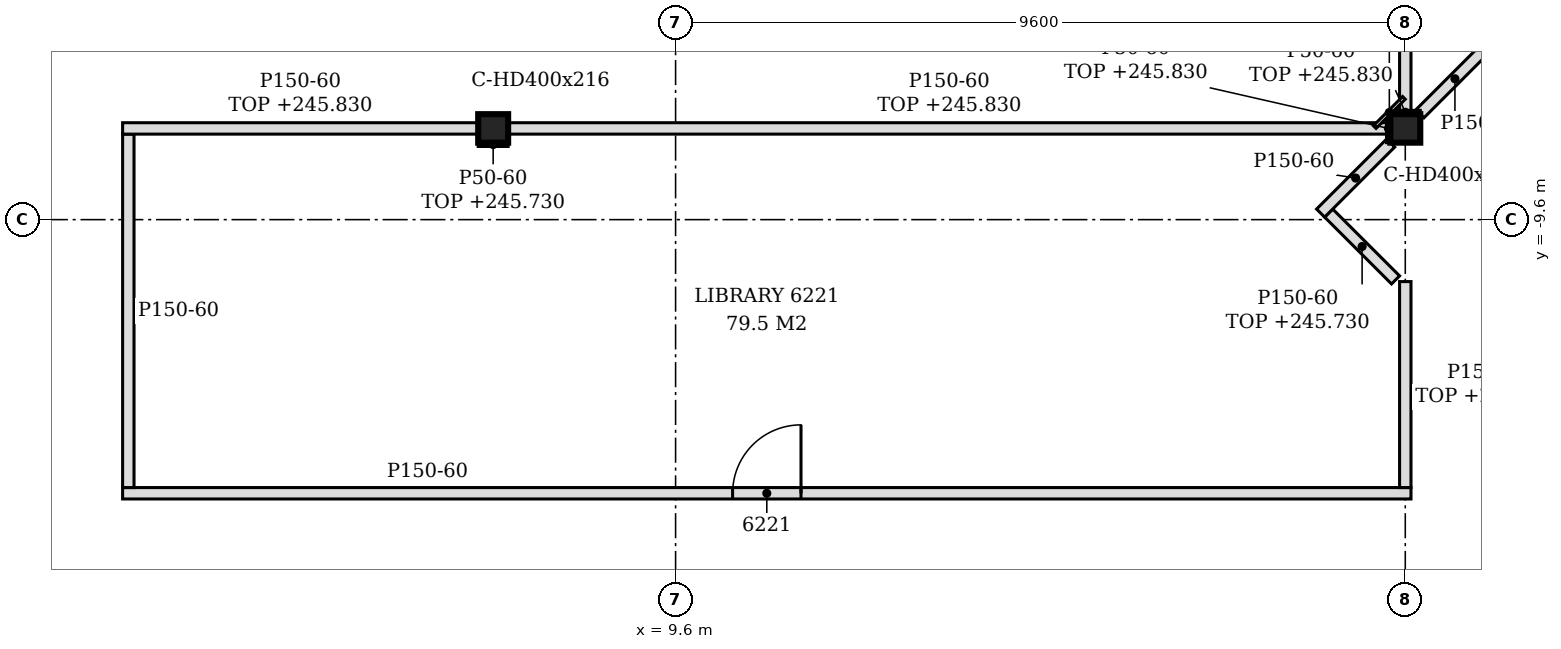
"""IFC4 building model, lengths in metres.
Left out: names, types, materials, properties, quantities, classifications, styles, units other than length and angle.
Written with IfcOpenShell. Run it as: python <this file> out.ifc"""

import sys

from ifc_helpers import new_model, si_unit, direction, frame, frame_2d, origin, origin_2d, place, context, subcontext, project, spatial, polyline, rectangle, i_section, outline, extrude, element, fill, save


model = new_model("IFC4")
c1 = context("Model", 3, precision=1e-05, world=origin(), true_north=direction((0.0, 1.0)))
c2 = subcontext(c1, "Body", "Model", "MODEL_VIEW")
j1 = project(units=[si_unit("LENGTHUNIT", "METRE"), si_unit("PLANEANGLEUNIT", "RADIAN")], contexts=[c1])
p1 = place(None, origin())
s1 = spatial("IfcSite", under=j1, at=p1, CompositionType="ELEMENT")
p2 = place(p1, origin())
s2 = spatial("IfcBuilding", under=s1, at=p2, CompositionType="ELEMENT")
p3 = place(p2, frame((0.0, 0.0, 243.0)))
s3 = spatial("IfcBuildingStorey", under=s2, at=p3, CompositionType="ELEMENT", Elevation=243.0)
for number, where, z_axis, x_axis in (
    (1, (7.2, -8.4, -0.15), (0.0, 0.0, 1.0), (1.0, 0.0, 0.0)),
    (2, (19.2, -8.4, -0.15), (0.0, 0.0, 1.0), (1.0, 0.0, 0.0)),
):
    element("IfcColumn", number, at=place(p3, frame(where, z_axis=z_axis, x_axis=x_axis)), inside=s3, PredefinedType="COLUMN", context=c2, shape_type="SweptSolid", body=[
        extrude(i_section(OverallWidth=0.394, OverallDepth=0.375, WebThickness=0.017, FlangeThickness=0.028, FilletRadius=0.015, at=origin_2d()), origin(), (0.0, 0.0, 1.0), 3.6),
    ])
p4 = place(p3, frame((2.325, -13.2, 0.0), z_axis=(0.0, 0.0, 1.0), x_axis=(1.0, 0.0, 0.0)))
e3 = element("IfcWall", 3, at=p4, inside=s3, PredefinedType="PARTITIONING", context=c2, shape_type="SweptSolid", body=[
    extrude(outline(polyline([(0.0, 0.0), (16.95, 0.0), (16.95, 2.73), (16.725, 2.73), (16.723, 3.45), (5.025, 3.45), (5.023, 2.73), (4.725, 2.73), (4.723, 3.45), (0.0, 3.45), (0.0, 0.0)])), frame((0.0, 0.075, 0.0), z_axis=(0.0, -1.0, 0.0), x_axis=(1.0, 0.0, 0.0)), (0.0, 0.0, 1.0), 0.15),
])
p5 = place(p4, frame((8.025, 0.0, 0.0)))
e4 = element("IfcOpeningElement", 4, at=p5, cuts=e3, PredefinedType="OPENING", context=c2, shape_type="SweptSolid", body=[
    extrude(rectangle(XDim=0.9, YDim=2.1, at=frame_2d((0.45, 1.05))), frame((0.0, 0.085, 0.0), z_axis=(0.0, -1.0, 0.0), x_axis=(1.0, 0.0, 0.0)), (0.0, 0.0, 1.0), 0.17),
])
p6 = place(p3, frame((2.4, -13.125, 0.0), z_axis=(0.0, 0.0, 1.0), x_axis=(0.0, 1.0, 0.0)))
e5 = element("IfcWall", 5, at=p6, inside=s3, PredefinedType="PARTITIONING", context=c2, shape_type="SweptSolid", body=[
    extrude(outline(polyline([(0.0, 0.0), (4.65, 0.0), (4.65, 2.83), (4.575, 2.83), (4.573, 3.45), (0.0, 3.45), (0.0, 0.0)])), frame((0.0, 0.075, 0.0), z_axis=(0.0, -1.0, 0.0), x_axis=(1.0, 0.0, 0.0)), (0.0, 0.0, 1.0), 0.15),
])
p7 = place(p3, frame((19.2, -13.125, 0.0), z_axis=(0.0, 0.0, 1.0), x_axis=(0.0, 1.0, 0.0)))
e6 = element("IfcWall", 6, at=p7, inside=s3, PredefinedType="PARTITIONING", context=c2, shape_type="SweptSolid", body=[
    extrude(rectangle(XDim=2.71, YDim=0.15, at=frame_2d((1.355, 0.0))), origin(), (0.0, 0.0, 1.0), 2.73),
])
p8 = place(p3, frame((19.072, -10.393, 0.0), z_axis=(0.0, 0.0, 1.0), x_axis=(-0.70740114323, 0.706812296552, 0.0)))
e7 = element("IfcWall", 7, at=p8, inside=s3, PredefinedType="PARTITIONING", context=c2, shape_type="SweptSolid", body=[
    extrude(rectangle(XDim=1.244, YDim=0.15, at=frame_2d((0.622, 0.0))), origin(), (0.0, 0.0, 1.0), 2.73),
])
p9 = place(p3, frame((18.086, -9.514, 0.0), z_axis=(0.0, 0.0, 1.0), x_axis=(0.707200419109, 0.707013130862, 0.0)))
e8 = element("IfcWall", 8, at=p9, inside=s3, PredefinedType="PARTITIONING", context=c2, shape_type="SweptSolid", body=[
    extrude(rectangle(XDim=1.303, YDim=0.15, at=frame_2d((0.652, 0.0))), origin(), (0.0, 0.0, 1.0), 3.45),
])
p10 = place(p3, frame((2.325, -8.4, 0.0), z_axis=(0.0, 0.0, 1.0), x_axis=(1.0, 0.0, 0.0)))
e9 = element("IfcWall", 9, at=p10, inside=s3, PredefinedType="PARTITIONING", context=c2, shape_type="SweptSolid", body=[
    extrude(rectangle(XDim=4.678, YDim=0.15, at=frame_2d((2.339, 0.0))), origin(), (0.0, 0.0, 1.0), 2.83),
])
p11 = place(p3, frame((7.397, -8.4, 0.0), z_axis=(0.0, 0.0, 1.0), x_axis=(1.0, 0.0, 0.0)))
e10 = element("IfcWall", 10, at=p11, inside=s3, PredefinedType="PARTITIONING", context=c2, shape_type="SweptSolid", body=[
    extrude(rectangle(XDim=11.606, YDim=0.15, at=frame_2d((5.803, 0.0))), origin(), (0.0, 0.0, 1.0), 2.83),
])
p12 = place(p3, frame((19.2, -8.212, 0.0), z_axis=(0.0, 0.0, 1.0), x_axis=(0.0, 1.0, 0.0)))
e11 = element("IfcWall", 11, at=p12, inside=s3, PredefinedType="PARTITIONING", context=c2, shape_type="SweptSolid", body=[
    extrude(rectangle(XDim=9.337, YDim=0.15, at=frame_2d((4.669, 0.0))), origin(), (0.0, 0.0, 1.0), 2.83),
])
p13 = place(p3, frame((19.392, -8.208, 0.0), z_axis=(0.0, 0.0, 1.0), x_axis=(0.707106781187, 0.707106781187, 0.0)))
e12 = element("IfcWall", 12, at=p13, inside=s3, PredefinedType="PARTITIONING", context=c2, shape_type="SweptSolid", body=[
    extrude(rectangle(XDim=1.304, YDim=0.15, at=frame_2d((0.652, 0.0))), origin(), (0.0, 0.0, 1.0), 3.45),
])
p14 = place(p3, frame((18.798, -8.382, 0.0), z_axis=(0.0, 0.0, 1.0), x_axis=(0.707106781187, 0.707106781187, 0.0)))
e13 = element("IfcWall", 13, at=p14, inside=s3, PredefinedType="PARTITIONING", context=c2, shape_type="SweptSolid", body=[
    extrude(rectangle(XDim=0.544, YDim=0.05, at=frame_2d((0.272, 0.0))), origin(), (0.0, 0.0, 1.0), 2.83),
])
p15 = place(p3, frame((7.003, -8.613, 0.0), z_axis=(0.0, 0.0, 1.0), x_axis=(1.0, 0.0, 0.0)))
e14 = element("IfcWall", 14, at=p15, inside=s3, PredefinedType="PARTITIONING", context=c2, shape_type="SweptSolid", body=[
    extrude(rectangle(XDim=0.394, YDim=0.05, at=frame_2d((0.197, 0.0))), origin(), (0.0, 0.0, 1.0), 2.73),
])
p16 = place(p3, frame((19.003, -8.188, 0.0), z_axis=(0.0, 0.0, 1.0), x_axis=(1.0, 0.0, 0.0)))
e15 = element("IfcWall", 15, at=p16, inside=s3, PredefinedType="PARTITIONING", context=c2, shape_type="SweptSolid", body=[
    extrude(rectangle(XDim=0.394, YDim=0.05, at=frame_2d((0.197, 0.0))), origin(), (0.0, 0.0, 1.0), 2.83),
])
p17 = place(p3, frame((18.978, -8.587, 0.0), z_axis=(0.0, 0.0, 1.0), x_axis=(0.0, 1.0, 0.0)))
e16 = element("IfcWall", 16, at=p17, inside=s3, PredefinedType="PARTITIONING", context=c2, shape_type="SweptSolid", body=[
    extrude(rectangle(XDim=0.375, YDim=0.05, at=frame_2d((0.188, 0.0))), origin(), (0.0, 0.0, 1.0), 2.83),
])
p18 = place(p5, origin())
e17 = element("IfcDoor", 17, at=p18, inside=s3, OperationType="SINGLE_SWING_RIGHT", PredefinedType="DOOR", context=c2, shape_type="SweptSolid", body=[
    extrude(rectangle(XDim=0.9, YDim=2.1, at=frame_2d((0.45, 1.05))), frame((0.0, 0.025, 0.0), z_axis=(0.0, -1.0, 0.0), x_axis=(1.0, 0.0, 0.0)), (0.0, 0.0, 1.0), 0.05),
])
fill(e4, e17)
save(model, sys.argv[1])
